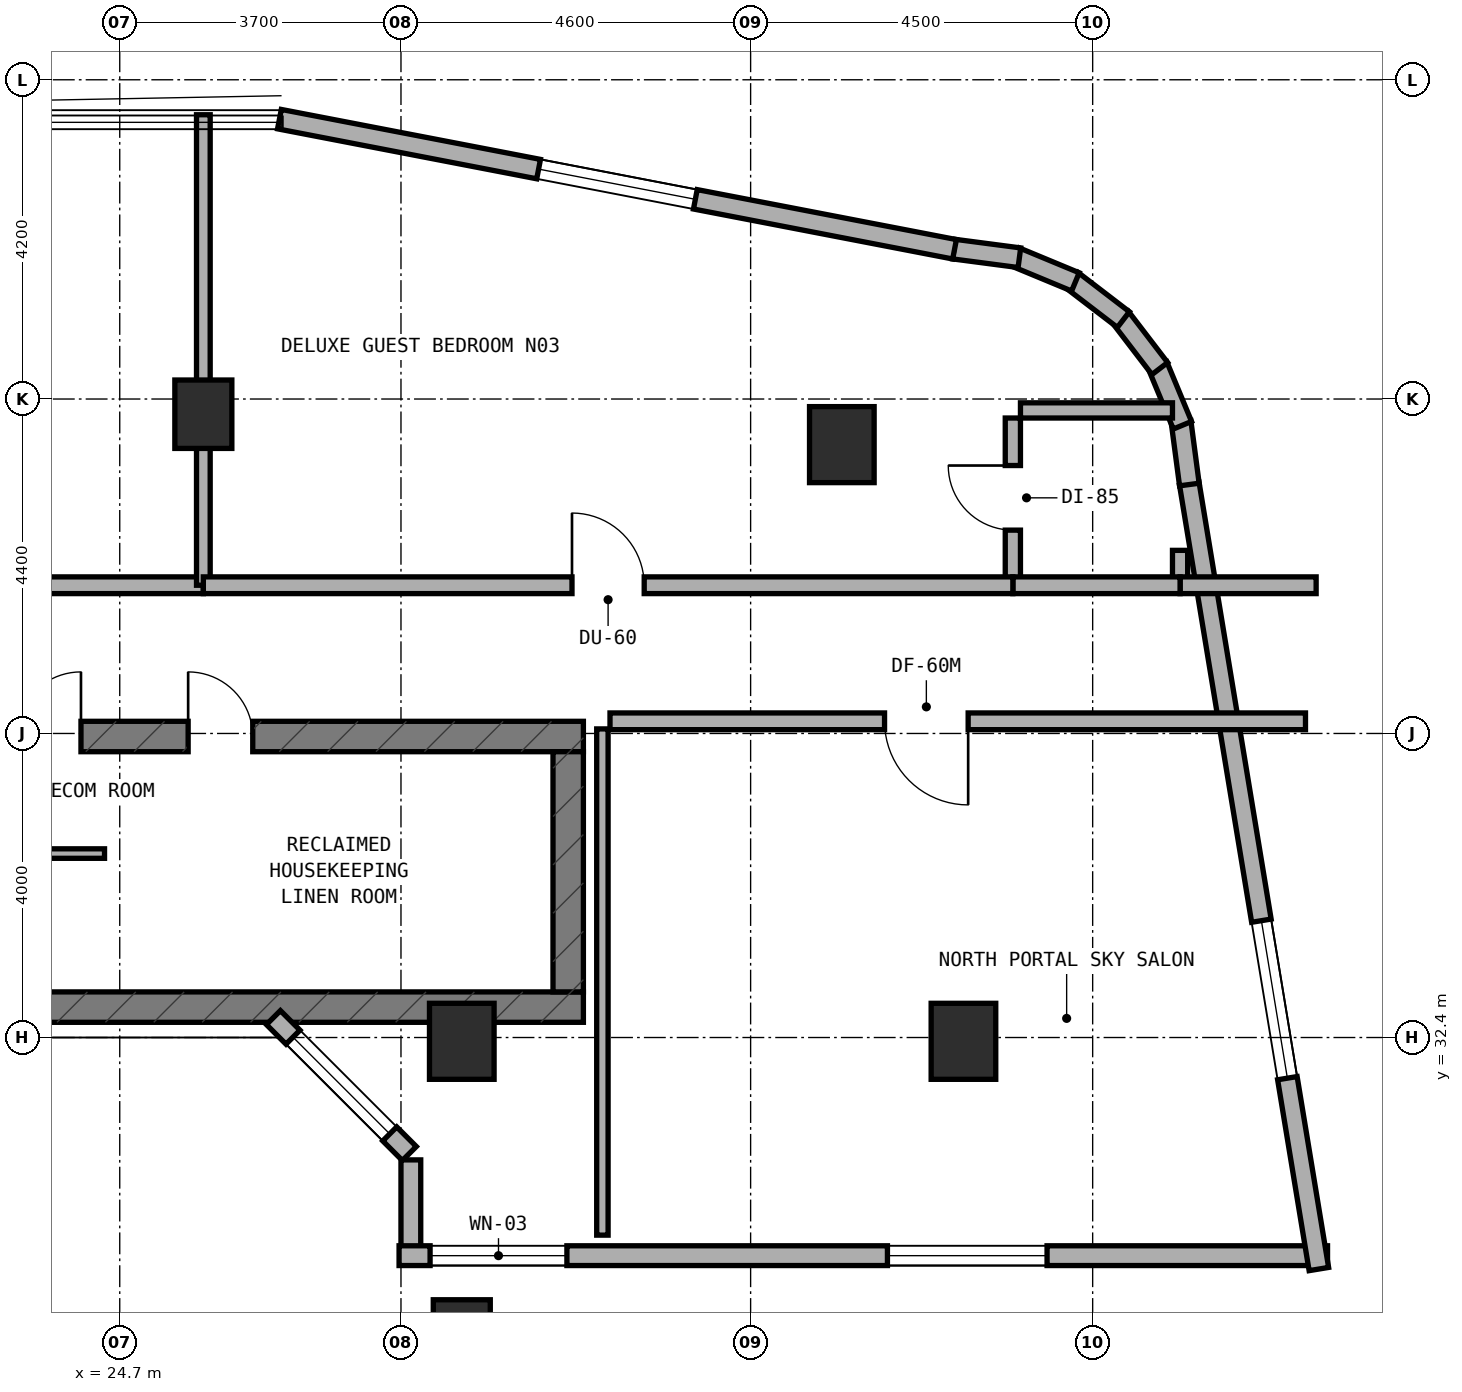
"""IFC4 building model, lengths in metres.
Left out: names, types, materials, properties, quantities, classifications, styles, units other than length and angle.
Written with IfcOpenShell. Run it as: python <this file> out.ifc"""

import sys

from ifc_helpers import new_model, si_unit, direction, frame, frame_2d, origin, origin_2d, place, context, subcontext, project, spatial, rectangle, extrude, element, fill, save


model = new_model("IFC4")
c1 = context("Model", 3, precision=1e-05, world=origin(), true_north=direction((0.0, 1.0)))
c2 = subcontext(c1, "Body", "Model", "MODEL_VIEW")
j1 = project(units=[si_unit("LENGTHUNIT", "METRE"), si_unit("PLANEANGLEUNIT", "RADIAN")], contexts=[c1])
p1 = place(None, origin())
s1 = spatial("IfcSite", under=j1, at=p1, CompositionType="ELEMENT")
p2 = place(p1, origin())
s2 = spatial("IfcBuilding", under=s1, at=p2, CompositionType="ELEMENT")
p3 = place(p2, frame((0.0, 0.0, 191.9)))
s3 = spatial("IfcBuildingStorey", under=s2, at=p3, CompositionType="ELEMENT", Elevation=191.9)
p4 = place(p3, frame((6.4, 32.8, 0.0), z_axis=(0.0, 0.0, 1.0), x_axis=(1.0, 0.0, 0.0)))
e1 = element("IfcWall", 1, at=p4, inside=s3, PredefinedType="SHEAR", context=c2, shape_type="SweptSolid", body=[
    extrude(rectangle(XDim=24.4, YDim=0.4, at=frame_2d((12.2, 0.0))), origin(), (0.0, 0.0, 1.0), 3.6),
])
p5 = place(p4, frame((6.05, 0.0, 0.0)))
e2 = element("IfcOpeningElement", 2, at=p5, cuts=e1, PredefinedType="OPENING", context=c2, shape_type="SweptSolid", body=[
    extrude(rectangle(XDim=1.1, YDim=2.15, at=frame_2d((0.55, 1.075))), frame((0.0, 0.21, 0.0), z_axis=(0.0, -1.0, 0.0), x_axis=(1.0, 0.0, 0.0)), (0.0, 0.0, 1.0), 0.42),
])
p6 = place(p3, frame((6.4, 36.36, 0.0), z_axis=(0.0, 0.0, 1.0), x_axis=(1.0, 0.0, 0.0)))
e3 = element("IfcWall", 3, at=p6, inside=s3, PredefinedType="SHEAR", context=c2, shape_type="SweptSolid", body=[
    extrude(rectangle(XDim=24.4, YDim=0.4, at=frame_2d((12.2, 0.0))), origin(), (0.0, 0.0, 1.0), 3.6),
])
p7 = place(p6, frame((9.15, 0.0, 0.0)))
e4 = element("IfcOpeningElement", 4, at=p7, cuts=e3, PredefinedType="OPENING", context=c2, shape_type="SweptSolid", body=[
    extrude(rectangle(XDim=1.2, YDim=2.15, at=frame_2d((0.6, 1.075))), frame((0.0, 0.21, 0.0), z_axis=(0.0, -1.0, 0.0), x_axis=(1.0, 0.0, 0.0)), (0.0, 0.0, 1.0), 0.42),
])
p8 = place(p6, frame((19.2, 0.0, 0.0)))
e5 = element("IfcOpeningElement", 5, at=p8, cuts=e3, PredefinedType="OPENING", context=c2, shape_type="SweptSolid", body=[
    extrude(rectangle(XDim=0.85, YDim=2.1, at=frame_2d((0.425, 1.05))), frame((0.0, 0.21, 0.0), z_axis=(0.0, -1.0, 0.0), x_axis=(1.0, 0.0, 0.0)), (0.0, 0.0, 1.0), 0.42),
])
p9 = place(p6, frame((16.94, 0.0, 0.0)))
e6 = element("IfcOpeningElement", 6, at=p9, cuts=e3, PredefinedType="OPENING", context=c2, shape_type="SweptSolid", body=[
    extrude(rectangle(XDim=0.85, YDim=2.1, at=frame_2d((0.425, 1.05))), frame((0.0, 0.21, 0.0), z_axis=(0.0, -1.0, 0.0), x_axis=(1.0, 0.0, 0.0)), (0.0, 0.0, 1.0), 0.42),
])
p10 = place(p3, frame((30.6, 33.0, 0.0), z_axis=(0.0, 0.0, 1.0), x_axis=(0.0, 1.0, 0.0)))
e7 = element("IfcWall", 7, at=p10, inside=s3, PredefinedType="SHEAR", context=c2, shape_type="SweptSolid", body=[
    extrude(rectangle(XDim=3.16, YDim=0.4, at=frame_2d((1.58, 0.0))), origin(), (0.0, 0.0, 1.0), 3.6),
])
p11 = place(p3, frame((25.8, 40.6, 0.0), z_axis=(0.0, 0.0, 1.0), x_axis=(1.0, 0.0, 0.0)))
e8 = element("IfcColumn", 8, at=p11, inside=s3, PredefinedType="COLUMN", context=c2, shape_type="SweptSolid", body=[
    extrude(rectangle(XDim=0.75, YDim=0.9, at=origin_2d()), origin(), (0.0, 0.0, 1.0), 3.6),
])
for number, where, z_axis, x_axis in (
    (9, (34.2, 40.2, 0.0), (0.0, 0.0, 1.0), (1.0, 0.0, 0.0)),
    (10, (35.8, 32.35, 0.0), (0.0, 0.0, 1.0), (1.0, 0.0, 0.0)),
    (11, (29.2, 32.35, 0.0), (0.0, 0.0, 1.0), (1.0, 0.0, 0.0)),
):
    element("IfcColumn", number, at=place(p3, frame(where, z_axis=z_axis, x_axis=x_axis)), inside=s3, PredefinedType="COLUMN", context=c2, shape_type="SweptSolid", body=[
        extrude(rectangle(XDim=0.85, YDim=1.0, at=origin_2d()), origin(), (0.0, 0.0, 1.0), 3.6),
    ])
p12 = place(p3, frame((29.2, 28.5, 0.0), z_axis=(0.0, 0.0, 1.0), x_axis=(1.0, 0.0, 0.0)))
e12 = element("IfcColumn", 12, at=p12, inside=s3, PredefinedType="COLUMN", context=c2, shape_type="SweptSolid", body=[
    extrude(rectangle(XDim=0.75, YDim=0.9, at=origin_2d()), origin(), (0.0, 0.0, 1.0), 3.6),
])
p13 = place(p3, frame((26.722, 32.662, 0.0), z_axis=(0.0, 0.0, 1.0), x_axis=(0.707106781187, -0.707106781187, 0.0)))
e13 = element("IfcWall", 13, at=p13, inside=s3, PredefinedType="STANDARD", context=c2, shape_type="SweptSolid", body=[
    extrude(rectangle(XDim=2.529, YDim=0.26, at=frame_2d((1.264, 0.0))), origin(), (0.0, 0.0, 1.0), 3.32),
])
p14 = place(p13, frame((0.364, 0.0, 0.85)))
e14 = element("IfcOpeningElement", 14, at=p14, cuts=e13, PredefinedType="OPENING", context=c2, shape_type="SweptSolid", body=[
    extrude(rectangle(XDim=1.8, YDim=1.5, at=frame_2d((0.9, 0.75))), frame((0.0, 0.14, 0.0), z_axis=(0.0, -1.0, 0.0), x_axis=(1.0, 0.0, 0.0)), (0.0, 0.0, 1.0), 0.28),
])
p15 = place(p3, frame((28.53, 30.79, 0.0), z_axis=(0.0, 0.0, 1.0), x_axis=(0.0, -1.0, 0.0)))
e15 = element("IfcWall", 15, at=p15, inside=s3, PredefinedType="STANDARD", context=c2, shape_type="SweptSolid", body=[
    extrude(rectangle(XDim=1.38, YDim=0.26, at=frame_2d((0.69, 0.0))), origin(), (0.0, 0.0, 1.0), 3.32),
])
p16 = place(p3, frame((28.375, 29.53, 0.0), z_axis=(0.0, 0.0, 1.0), x_axis=(1.0, 0.0, 0.0)))
e16 = element("IfcWall", 16, at=p16, inside=s3, PredefinedType="STANDARD", context=c2, shape_type="SweptSolid", body=[
    extrude(rectangle(XDim=12.215, YDim=0.26, at=frame_2d((6.107, 0.0))), origin(), (0.0, 0.0, 1.0), 2.995),
])
p17 = place(p16, frame((0.408, 0.0, 0.85)))
e17 = element("IfcOpeningElement", 17, at=p17, cuts=e16, PredefinedType="OPENING", context=c2, shape_type="SweptSolid", body=[
    extrude(rectangle(XDim=1.8, YDim=1.5, at=frame_2d((0.9, 0.75))), frame((0.0, 0.14, 0.0), z_axis=(0.0, -1.0, 0.0), x_axis=(1.0, 0.0, 0.0)), (0.0, 0.0, 1.0), 0.28),
])
p18 = place(p16, frame((6.425, 0.0, 0.85)))
e18 = element("IfcOpeningElement", 18, at=p18, cuts=e16, PredefinedType="OPENING", context=c2, shape_type="SweptSolid", body=[
    extrude(rectangle(XDim=2.1, YDim=1.5, at=frame_2d((1.05, 0.75))), frame((0.0, 0.14, 0.0), z_axis=(0.0, -1.0, 0.0), x_axis=(1.0, 0.0, 0.0)), (0.0, 0.0, 1.0), 0.28),
])
p19 = place(p3, frame((40.476, 29.354, 0.0), z_axis=(0.0, 0.0, 1.0), x_axis=(-0.162811037825, 0.986657268742, 0.0)))
e19 = element("IfcWall", 19, at=p19, inside=s3, PredefinedType="STANDARD", context=c2, shape_type="SweptSolid", body=[
    extrude(rectangle(XDim=10.473, YDim=0.26, at=frame_2d((5.236, 0.0))), origin(), (0.0, 0.0, 1.0), 3.32),
])
p20 = place(p19, frame((2.545, 0.0, 0.85)))
e20 = element("IfcOpeningElement", 20, at=p20, cuts=e19, PredefinedType="OPENING", context=c2, shape_type="SweptSolid", body=[
    extrude(rectangle(XDim=2.1, YDim=1.5, at=frame_2d((1.05, 0.75))), frame((0.0, 0.14, 0.0), z_axis=(0.0, -1.0, 0.0), x_axis=(1.0, 0.0, 0.0)), (0.0, 0.0, 1.0), 0.28),
])
p21 = place(p3, frame((38.772, 39.675, 0.0), z_axis=(0.0, 0.0, 1.0), x_axis=(-0.130704676564, 0.99142134712, 0.0)))
e21 = element("IfcWall", 21, at=p21, inside=s3, PredefinedType="STANDARD", context=c2, shape_type="SweptSolid", body=[
    extrude(rectangle(XDim=0.833, YDim=0.26, at=frame_2d((0.417, 0.0))), origin(), (0.0, 0.0, 1.0), 3.32),
])
p22 = place(p3, frame((38.681, 40.455, 0.0), z_axis=(0.0, 0.0, 1.0), x_axis=(-0.383086687796, 0.923712395518, 0.0)))
e22 = element("IfcWall", 22, at=p22, inside=s3, PredefinedType="STANDARD", context=c2, shape_type="SweptSolid", body=[
    extrude(rectangle(XDim=0.851, YDim=0.26, at=frame_2d((0.425, 0.0))), origin(), (0.0, 0.0, 1.0), 3.32),
])
for number, where, z_axis, x_axis in (
    (23, (38.383, 41.201, 0.0), (0.0, 0.0, 1.0), (-0.608, 0.794, 0.0)),
    (24, (37.904, 41.845, 0.0), (0.0, 0.0, 1.0), (-0.794, 0.608, 0.0)),
):
    element("IfcWall", number, at=place(p3, frame(where, z_axis=z_axis, x_axis=x_axis)), inside=s3, PredefinedType="STANDARD", context=c2, shape_type="SweptSolid", body=[
        extrude(rectangle(XDim=0.85, YDim=0.26, at=frame_2d((0.425, 0.0))), origin(), (0.0, 0.0, 1.0), 3.32),
    ])
p23 = place(p3, frame((37.273, 42.341, 0.0), z_axis=(0.0, 0.0, 1.0), x_axis=(-0.923712395518, 0.383086687796, 0.0)))
e25 = element("IfcWall", 25, at=p23, inside=s3, PredefinedType="STANDARD", context=c2, shape_type="SweptSolid", body=[
    extrude(rectangle(XDim=0.851, YDim=0.26, at=frame_2d((0.425, 0.0))), origin(), (0.0, 0.0, 1.0), 3.32),
])
p24 = place(p3, frame((36.536, 42.659, 0.0), z_axis=(0.0, 0.0, 1.0), x_axis=(-0.991488716273, 0.130192647656, 0.0)))
e26 = element("IfcWall", 26, at=p24, inside=s3, PredefinedType="STANDARD", context=c2, shape_type="SweptSolid", body=[
    extrude(rectangle(XDim=0.868, YDim=0.26, at=frame_2d((0.434, 0.0))), origin(), (0.0, 0.0, 1.0), 3.32),
])
p25 = place(p3, frame((35.683, 42.77, 0.0), z_axis=(0.0, 0.0, 1.0), x_axis=(-0.98192801022, 0.189254809039, 0.0)))
e27 = element("IfcWall", 27, at=p25, inside=s3, PredefinedType="STANDARD", context=c2, shape_type="SweptSolid", body=[
    extrude(rectangle(XDim=9.046, YDim=0.26, at=frame_2d((4.523, 0.0))), origin(), (0.0, 0.0, 1.0), 3.32),
])
p26 = place(p25, frame((3.473, 0.0, 0.85)))
e28 = element("IfcOpeningElement", 28, at=p26, cuts=e27, PredefinedType="OPENING", context=c2, shape_type="SweptSolid", body=[
    extrude(rectangle(XDim=2.1, YDim=1.5, at=frame_2d((1.05, 0.75))), frame((0.0, 0.14, 0.0), z_axis=(0.0, -1.0, 0.0), x_axis=(1.0, 0.0, 0.0)), (0.0, 0.0, 1.0), 0.28),
])
p27 = place(p3, frame((23.15, 34.82, 0.0), z_axis=(0.0, 0.0, 1.0), x_axis=(1.0, 0.0, 0.0)))
e29 = element("IfcWall", 29, at=p27, inside=s3, PredefinedType="PARTITIONING", context=c2, shape_type="SweptSolid", body=[
    extrude(rectangle(XDim=1.35, YDim=0.125, at=frame_2d((0.675, 0.0))), origin(), (0.0, 0.0, 1.0), 3.32),
])
p28 = place(p3, frame((10.0, 38.35, 0.0), z_axis=(0.0, 0.0, 1.0), x_axis=(1.0, 0.0, 0.0)))
e30 = element("IfcWall", 30, at=p28, inside=s3, PredefinedType="SOLIDWALL", context=c2, shape_type="SweptSolid", body=[
    extrude(rectangle(XDim=15.8, YDim=0.22, at=frame_2d((7.9, 0.0))), origin(), (0.0, 0.0, 1.0), 2.995),
])
p29 = place(p28, frame((7.425, 0.0, 0.0)))
e31 = element("IfcOpeningElement", 31, at=p29, cuts=e30, PredefinedType="OPENING", context=c2, shape_type="SweptSolid", body=[
    extrude(rectangle(XDim=0.95, YDim=2.1, at=frame_2d((0.475, 1.05))), frame((0.0, 0.12, 0.0), z_axis=(0.0, -1.0, 0.0), x_axis=(1.0, 0.0, 0.0)), (0.0, 0.0, 1.0), 0.24),
])
p30 = place(p3, frame((25.8, 38.35, 0.0), z_axis=(0.0, 0.0, 1.0), x_axis=(0.0, 1.0, 0.0)))
e32 = element("IfcWall", 32, at=p30, inside=s3, PredefinedType="SOLIDWALL", context=c2, shape_type="SweptSolid", body=[
    extrude(rectangle(XDim=6.19, YDim=0.18, at=frame_2d((3.095, 0.0))), origin(), (0.0, 0.0, 1.0), 2.935),
])
p31 = place(p3, frame((36.45, 38.45, 0.0), z_axis=(0.0, 0.0, 1.0), x_axis=(0.0, 1.0, 0.0)))
e33 = element("IfcWall", 33, at=p31, inside=s3, PredefinedType="PLUMBINGWALL", context=c2, shape_type="SweptSolid", body=[
    extrude(rectangle(XDim=2.1, YDim=0.2, at=frame_2d((1.05, 0.0))), origin(), (0.0, 0.0, 1.0), 3.32),
])
p32 = place(p31, frame((0.625, 0.0, 0.0)))
e34 = element("IfcOpeningElement", 34, at=p32, cuts=e33, PredefinedType="OPENING", context=c2, shape_type="SweptSolid", body=[
    extrude(rectangle(XDim=0.85, YDim=2.1, at=frame_2d((0.425, 1.05))), frame((0.0, 0.11, 0.0), z_axis=(0.0, -1.0, 0.0), x_axis=(1.0, 0.0, 0.0)), (0.0, 0.0, 1.0), 0.22),
])
p33 = place(p3, frame((36.55, 40.65, 0.0), z_axis=(0.0, 0.0, 1.0), x_axis=(1.0, 0.0, 0.0)))
e35 = element("IfcWall", 35, at=p33, inside=s3, PredefinedType="PLUMBINGWALL", context=c2, shape_type="SweptSolid", body=[
    extrude(rectangle(XDim=2.0, YDim=0.2, at=frame_2d((1.0, 0.0))), origin(), (0.0, 0.0, 1.0), 3.32),
])
p34 = place(p3, frame((38.65, 38.35, 0.0), z_axis=(0.0, 0.0, 1.0), x_axis=(0.0, 1.0, 0.0)))
e36 = element("IfcWall", 36, at=p34, inside=s3, PredefinedType="PLUMBINGWALL", context=c2, shape_type="SweptSolid", body=[
    extrude(rectangle(XDim=0.459, YDim=0.2, at=frame_2d((0.229, 0.0))), origin(), (0.0, 0.0, 1.0), 3.32),
])
p35 = place(p3, frame((38.65, 38.35, 0.0), z_axis=(0.0, 0.0, 1.0), x_axis=(1.0, 0.0, 0.0)))
e37 = element("IfcWall", 37, at=p35, inside=s3, PredefinedType="SOLIDWALL", context=c2, shape_type="SweptSolid", body=[
    extrude(rectangle(XDim=1.79, YDim=0.22, at=frame_2d((0.895, 0.0))), origin(), (0.0, 0.0, 1.0), 3.32),
])
p36 = place(p3, frame((36.45, 38.35, 0.0), z_axis=(0.0, 0.0, 1.0), x_axis=(1.0, 0.0, 0.0)))
e38 = element("IfcWall", 38, at=p36, inside=s3, PredefinedType="SOLIDWALL", context=c2, shape_type="SweptSolid", body=[
    extrude(rectangle(XDim=2.2, YDim=0.22, at=frame_2d((1.1, 0.0))), origin(), (0.0, 0.0, 1.0), 3.32),
])
p37 = place(p3, frame((25.8, 38.35, 0.0), z_axis=(0.0, 0.0, 1.0), x_axis=(1.0, 0.0, 0.0)))
e39 = element("IfcWall", 39, at=p37, inside=s3, PredefinedType="SOLIDWALL", context=c2, shape_type="SweptSolid", body=[
    extrude(rectangle(XDim=10.65, YDim=0.22, at=frame_2d((5.325, 0.0))), origin(), (0.0, 0.0, 1.0), 2.935),
])
p38 = place(p37, frame((4.85, 0.0, 0.0)))
e40 = element("IfcOpeningElement", 40, at=p38, cuts=e39, PredefinedType="OPENING", context=c2, shape_type="SweptSolid", body=[
    extrude(rectangle(XDim=0.95, YDim=2.1, at=frame_2d((0.475, 1.05))), frame((0.0, 0.12, 0.0), z_axis=(0.0, -1.0, 0.0), x_axis=(1.0, 0.0, 0.0)), (0.0, 0.0, 1.0), 0.24),
])
p39 = place(p3, frame((31.05, 29.8, 0.0), z_axis=(0.0, 0.0, 1.0), x_axis=(0.0, 1.0, 0.0)))
e41 = element("IfcWall", 41, at=p39, inside=s3, PredefinedType="PARTITIONING", context=c2, shape_type="SweptSolid", body=[
    extrude(rectangle(XDim=6.66, YDim=0.15, at=frame_2d((3.33, 0.0))), origin(), (0.0, 0.0, 1.0), 2.995),
])
p40 = place(p3, frame((31.15, 36.56, 0.0), z_axis=(0.0, 0.0, 1.0), x_axis=(1.0, 0.0, 0.0)))
e42 = element("IfcWall", 42, at=p40, inside=s3, PredefinedType="SOLIDWALL", context=c2, shape_type="SweptSolid", body=[
    extrude(rectangle(XDim=9.15, YDim=0.22, at=frame_2d((4.575, 0.0))), origin(), (0.0, 0.0, 1.0), 2.935),
])
p41 = place(p40, frame((3.612, 0.0, 0.0)))
e43 = element("IfcOpeningElement", 43, at=p41, cuts=e42, PredefinedType="OPENING", context=c2, shape_type="SweptSolid", body=[
    extrude(rectangle(XDim=1.1, YDim=2.1, at=frame_2d((0.55, 1.05))), frame((0.0, 0.12, 0.0), z_axis=(0.0, -1.0, 0.0), x_axis=(1.0, 0.0, 0.0)), (0.0, 0.0, 1.0), 0.24),
])
p42 = place(p14, origin())
e44 = element("IfcWindow", 44, at=p42, inside=s3, PartitioningType="SINGLE_PANEL", PredefinedType="WINDOW", context=c2, shape_type="SweptSolid", body=[
    extrude(rectangle(XDim=1.8, YDim=1.5, at=frame_2d((0.9, 0.75))), frame((0.0, 0.03, 0.0), z_axis=(0.0, -1.0, 0.0), x_axis=(1.0, 0.0, 0.0)), (0.0, 0.0, 1.0), 0.06),
])
fill(e14, e44)
p43 = place(p17, origin())
e45 = element("IfcWindow", 45, at=p43, inside=s3, PartitioningType="SINGLE_PANEL", PredefinedType="WINDOW", context=c2, shape_type="SweptSolid", body=[
    extrude(rectangle(XDim=1.8, YDim=1.5, at=frame_2d((0.9, 0.75))), frame((0.0, 0.03, 0.0), z_axis=(0.0, -1.0, 0.0), x_axis=(1.0, 0.0, 0.0)), (0.0, 0.0, 1.0), 0.06),
])
fill(e17, e45)
p44 = place(p18, origin())
e46 = element("IfcWindow", 46, at=p44, inside=s3, PartitioningType="SINGLE_PANEL", PredefinedType="WINDOW", context=c2, shape_type="SweptSolid", body=[
    extrude(rectangle(XDim=2.1, YDim=1.5, at=frame_2d((1.05, 0.75))), frame((0.0, 0.03, 0.0), z_axis=(0.0, -1.0, 0.0), x_axis=(1.0, 0.0, 0.0)), (0.0, 0.0, 1.0), 0.06),
])
fill(e18, e46)
p45 = place(p20, origin())
e47 = element("IfcWindow", 47, at=p45, inside=s3, PartitioningType="SINGLE_PANEL", PredefinedType="WINDOW", context=c2, shape_type="SweptSolid", body=[
    extrude(rectangle(XDim=2.1, YDim=1.5, at=frame_2d((1.05, 0.75))), frame((0.0, 0.03, 0.0), z_axis=(0.0, -1.0, 0.0), x_axis=(1.0, 0.0, 0.0)), (0.0, 0.0, 1.0), 0.06),
])
fill(e20, e47)
p46 = place(p26, origin())
e48 = element("IfcWindow", 48, at=p46, inside=s3, PartitioningType="SINGLE_PANEL", PredefinedType="WINDOW", context=c2, shape_type="SweptSolid", body=[
    extrude(rectangle(XDim=2.1, YDim=1.5, at=frame_2d((1.05, 0.75))), frame((0.0, 0.03, 0.0), z_axis=(0.0, -1.0, 0.0), x_axis=(1.0, 0.0, 0.0)), (0.0, 0.0, 1.0), 0.06),
])
fill(e28, e48)
p47 = place(p8, origin())
e49 = element("IfcDoor", 49, at=p47, inside=s3, OperationType="SINGLE_SWING_LEFT", PredefinedType="DOOR", context=c2, shape_type="SweptSolid", body=[
    extrude(rectangle(XDim=0.85, YDim=2.1, at=frame_2d((0.425, 1.05))), frame((0.0, 0.025, 0.0), z_axis=(0.0, -1.0, 0.0), x_axis=(1.0, 0.0, 0.0)), (0.0, 0.0, 1.0), 0.05),
])
fill(e5, e49)
p48 = place(p9, origin())
e50 = element("IfcDoor", 50, at=p48, inside=s3, OperationType="SINGLE_SWING_RIGHT", PredefinedType="DOOR", context=c2, shape_type="SweptSolid", body=[
    extrude(rectangle(XDim=0.85, YDim=2.1, at=frame_2d((0.425, 1.05))), frame((0.0, 0.025, 0.0), z_axis=(0.0, -1.0, 0.0), x_axis=(1.0, 0.0, 0.0)), (0.0, 0.0, 1.0), 0.05),
])
fill(e6, e50)
p49 = place(p32, origin())
e51 = element("IfcDoor", 51, at=p49, inside=s3, OperationType="SINGLE_SWING_RIGHT", PredefinedType="DOOR", context=c2, shape_type="SweptSolid", body=[
    extrude(rectangle(XDim=0.85, YDim=2.1, at=frame_2d((0.425, 1.05))), frame((0.0, 0.025, 0.0), z_axis=(0.0, -1.0, 0.0), x_axis=(1.0, 0.0, 0.0)), (0.0, 0.0, 1.0), 0.05),
])
fill(e34, e51)
p50 = place(p38, origin())
e52 = element("IfcDoor", 52, at=p50, inside=s3, OperationType="SINGLE_SWING_LEFT", PredefinedType="DOOR", context=c2, shape_type="SweptSolid", body=[
    extrude(rectangle(XDim=0.95, YDim=2.1, at=frame_2d((0.475, 1.05))), frame((0.0, 0.025, 0.0), z_axis=(0.0, -1.0, 0.0), x_axis=(1.0, 0.0, 0.0)), (0.0, 0.0, 1.0), 0.05),
])
fill(e40, e52)
p51 = place(p41, frame((1.1, 0.0, 0.0), z_axis=(0.0, 0.0, 1.0), x_axis=(-1.0, 0.0, 0.0)))
e53 = element("IfcDoor", 53, at=p51, inside=s3, OperationType="SINGLE_SWING_LEFT", PredefinedType="DOOR", context=c2, shape_type="SweptSolid", body=[
    extrude(rectangle(XDim=1.1, YDim=2.1, at=frame_2d((0.55, 1.05))), frame((0.0, 0.025, 0.0), z_axis=(0.0, -1.0, 0.0), x_axis=(1.0, 0.0, 0.0)), (0.0, 0.0, 1.0), 0.05),
])
fill(e43, e53)
save(model, sys.argv[1])
